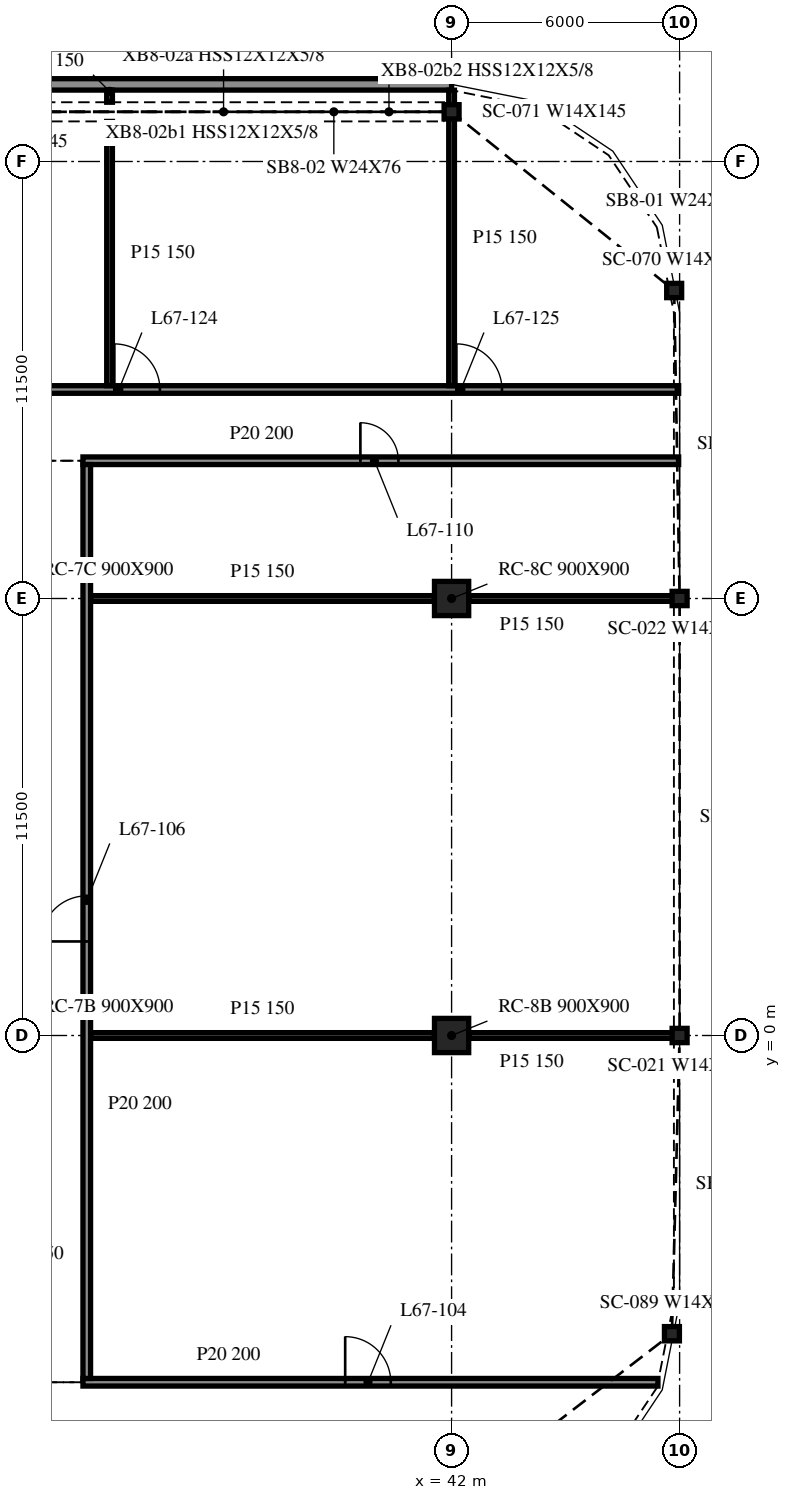
"""IFC4 building model, lengths in metres.
Left out: names, types, materials, properties, quantities, classifications, styles, units other than length and angle.
Written with IfcOpenShell. Run it as: python <this file> out.ifc"""

import sys

from ifc_helpers import new_model, si_unit, direction, frame, frame_2d, origin, origin_2d, place, context, subcontext, project, spatial, rectangle, i_section, extrude, element, fill, save


model = new_model("IFC4")
c1 = context("Model", 3, precision=1e-05, world=origin(), true_north=direction((0.0, 1.0)))
c2 = subcontext(c1, "Body", "Model", "MODEL_VIEW")
j1 = project(units=[si_unit("LENGTHUNIT", "METRE"), si_unit("PLANEANGLEUNIT", "RADIAN")], contexts=[c1])
p1 = place(None, origin())
s1 = spatial("IfcSite", under=j1, at=p1, CompositionType="ELEMENT")
p2 = place(p1, origin())
s2 = spatial("IfcBuilding", under=s1, at=p2, CompositionType="ELEMENT")
p3 = place(p2, frame((0.0, 0.0, 274.7)))
s3 = spatial("IfcBuildingStorey", under=s2, at=p3, CompositionType="ELEMENT", Elevation=274.7)
for number, where, z_axis, x_axis in (
    (1, (42.0, 0.0, -0.34), (0.0, 0.0, 1.0), (1.0, 0.0, 0.0)),
    (2, (42.0, 11.5, -0.34), (0.0, 0.0, 1.0), (1.0, 0.0, 0.0)),
):
    element("IfcColumn", number, at=place(p3, frame(where, z_axis=z_axis, x_axis=x_axis)), inside=s3, PredefinedType="COLUMN", context=c2, shape_type="SweptSolid", body=[
        extrude(rectangle(XDim=0.9, YDim=0.9, at=origin_2d()), origin(), (0.0, 0.0, 1.0), 3.8),
    ])
for number, where, z_axis, x_axis in (
    (3, (47.857, 19.605, -0.34), (0.0, 0.0, 1.0), (1.0, 0.0, 0.0)),
    (4, (42.0, 24.307, -0.34), (0.0, 0.0, 1.0), (1.0, 0.0, 0.0)),
    (5, (47.798, -7.848, -0.34), (0.0, 0.0, 1.0), (1.0, 0.0, 0.0)),
    (6, (48.0, 0.0, -0.34), (0.0, 0.0, 1.0), (1.0, 0.0, 0.0)),
    (7, (48.0, 11.5, -0.34), (0.0, 0.0, 1.0), (1.0, 0.0, 0.0)),
):
    element("IfcColumn", number, at=place(p3, frame(where, z_axis=z_axis, x_axis=x_axis)), inside=s3, PredefinedType="COLUMN", context=c2, shape_type="SweptSolid", body=[
        extrude(i_section(OverallWidth=0.394, OverallDepth=0.376, WebThickness=0.017, FlangeThickness=0.028, at=origin_2d()), origin(), (0.0, 0.0, 1.0), 3.8),
    ])
p4 = place(p3, frame((42.0, 25.029, 0.0), z_axis=(0.0, 0.0, 1.0), x_axis=(-1.0, 0.0, 0.0)))
e8 = element("IfcWall", 8, at=p4, inside=s3, PredefinedType="NOTDEFINED", context=c2, shape_type="SweptSolid", body=[
    extrude(rectangle(XDim=84.0, YDim=0.3, at=frame_2d((42.0, 0.0))), origin(), (0.0, 0.0, 1.0), 2.853),
])
p5 = place(p3, frame((32.3, -9.125, 0.0), z_axis=(0.0, 0.0, 1.0), x_axis=(1.0, 0.0, 0.0)))
e9 = element("IfcWall", 9, at=p5, inside=s3, PredefinedType="PARTITIONING", context=c2, shape_type="SweptSolid", body=[
    extrude(rectangle(XDim=15.13, YDim=0.2, at=frame_2d((7.565, 0.0))), origin(), (0.0, 0.0, 1.0), 3.46),
])
p6 = place(p5, frame((6.9, 0.0, 0.0)))
e10 = element("IfcOpeningElement", 10, at=p6, cuts=e9, PredefinedType="OPENING", context=c2, shape_type="SweptSolid", body=[
    extrude(rectangle(XDim=1.2, YDim=2.1, at=frame_2d((0.6, 1.05))), frame((0.0, 0.11, 0.0), z_axis=(0.0, -1.0, 0.0), x_axis=(1.0, 0.0, 0.0)), (0.0, 0.0, 1.0), 0.22),
])
p7 = place(p3, frame((32.5, 0.0, 0.0), z_axis=(0.0, 0.0, 1.0), x_axis=(1.0, 0.0, 0.0)))
e11 = element("IfcWall", 11, at=p7, inside=s3, PredefinedType="PARTITIONING", context=c2, shape_type="SweptSolid", body=[
    extrude(rectangle(XDim=9.05, YDim=0.15, at=frame_2d((4.525, 0.0))), origin(), (0.0, 0.0, 1.0), 3.46),
])
p8 = place(p3, frame((42.45, 0.0, 0.0), z_axis=(0.0, 0.0, 1.0), x_axis=(1.0, 0.0, 0.0)))
e12 = element("IfcWall", 12, at=p8, inside=s3, PredefinedType="PARTITIONING", context=c2, shape_type="SweptSolid", body=[
    extrude(rectangle(XDim=5.525, YDim=0.15, at=frame_2d((2.763, 0.0))), origin(), (0.0, 0.0, 1.0), 3.46),
])
p9 = place(p3, frame((32.5, 11.5, 0.0), z_axis=(0.0, 0.0, 1.0), x_axis=(1.0, 0.0, 0.0)))
e13 = element("IfcWall", 13, at=p9, inside=s3, PredefinedType="PARTITIONING", context=c2, shape_type="SweptSolid", body=[
    extrude(rectangle(XDim=9.05, YDim=0.15, at=frame_2d((4.525, 0.0))), origin(), (0.0, 0.0, 1.0), 3.46),
])
p10 = place(p3, frame((42.45, 11.5, 0.0), z_axis=(0.0, 0.0, 1.0), x_axis=(1.0, 0.0, 0.0)))
e14 = element("IfcWall", 14, at=p10, inside=s3, PredefinedType="PARTITIONING", context=c2, shape_type="SweptSolid", body=[
    extrude(rectangle(XDim=5.525, YDim=0.15, at=frame_2d((2.763, 0.0))), origin(), (0.0, 0.0, 1.0), 3.46),
])
p11 = place(p3, frame((32.3, 15.125, 0.0), z_axis=(0.0, 0.0, 1.0), x_axis=(1.0, 0.0, 0.0)))
e15 = element("IfcWall", 15, at=p11, inside=s3, PredefinedType="PARTITIONING", context=c2, shape_type="SweptSolid", body=[
    extrude(rectangle(XDim=15.675, YDim=0.2, at=frame_2d((7.837, 0.0))), origin(), (0.0, 0.0, 1.0), 3.46),
])
p12 = place(p11, frame((7.3, 0.0, 0.0)))
e16 = element("IfcOpeningElement", 16, at=p12, cuts=e15, PredefinedType="OPENING", context=c2, shape_type="SweptSolid", body=[
    extrude(rectangle(XDim=1.0, YDim=2.1, at=frame_2d((0.5, 1.05))), frame((0.0, 0.11, 0.0), z_axis=(0.0, -1.0, 0.0), x_axis=(1.0, 0.0, 0.0)), (0.0, 0.0, 1.0), 0.22),
])
p13 = place(p3, frame((-47.975, 17.0, 0.0), z_axis=(0.0, 0.0, 1.0), x_axis=(1.0, 0.0, 0.0)))
e17 = element("IfcWall", 17, at=p13, inside=s3, PredefinedType="PARTITIONING", context=c2, shape_type="SweptSolid", body=[
    extrude(rectangle(XDim=95.95, YDim=0.2, at=frame_2d((47.975, 0.0))), origin(), (0.0, 0.0, 1.0), 3.46),
])
p14 = place(p13, frame((7.3, 0.0, 0.0)))
e18 = element("IfcOpeningElement", 18, at=p14, cuts=e17, PredefinedType="OPENING", context=c2, shape_type="SweptSolid", body=[
    extrude(rectangle(XDim=1.2, YDim=2.1, at=frame_2d((0.6, 1.05))), frame((0.0, 0.11, 0.0), z_axis=(0.0, -1.0, 0.0), x_axis=(1.0, 0.0, 0.0)), (0.0, 0.0, 1.0), 0.22),
])
p15 = place(p13, frame((13.3, 0.0, 0.0)))
e19 = element("IfcOpeningElement", 19, at=p15, cuts=e17, PredefinedType="OPENING", context=c2, shape_type="SweptSolid", body=[
    extrude(rectangle(XDim=1.2, YDim=2.1, at=frame_2d((0.6, 1.05))), frame((0.0, 0.11, 0.0), z_axis=(0.0, -1.0, 0.0), x_axis=(1.0, 0.0, 0.0)), (0.0, 0.0, 1.0), 0.22),
])
p16 = place(p13, frame((19.3, 0.0, 0.0)))
e20 = element("IfcOpeningElement", 20, at=p16, cuts=e17, PredefinedType="OPENING", context=c2, shape_type="SweptSolid", body=[
    extrude(rectangle(XDim=1.2, YDim=2.1, at=frame_2d((0.6, 1.05))), frame((0.0, 0.11, 0.0), z_axis=(0.0, -1.0, 0.0), x_axis=(1.0, 0.0, 0.0)), (0.0, 0.0, 1.0), 0.22),
])
p17 = place(p13, frame((28.5, 0.0, 0.0)))
e21 = element("IfcOpeningElement", 21, at=p17, cuts=e17, PredefinedType="OPENING", context=c2, shape_type="SweptSolid", body=[
    extrude(rectangle(XDim=1.0, YDim=2.1, at=frame_2d((0.5, 1.05))), frame((0.0, 0.11, 0.0), z_axis=(0.0, -1.0, 0.0), x_axis=(1.0, 0.0, 0.0)), (0.0, 0.0, 1.0), 0.22),
])
p18 = place(p13, frame((31.3, 0.0, 0.0)))
e22 = element("IfcOpeningElement", 22, at=p18, cuts=e17, PredefinedType="OPENING", context=c2, shape_type="SweptSolid", body=[
    extrude(rectangle(XDim=1.2, YDim=2.1, at=frame_2d((0.6, 1.05))), frame((0.0, 0.11, 0.0), z_axis=(0.0, -1.0, 0.0), x_axis=(1.0, 0.0, 0.0)), (0.0, 0.0, 1.0), 0.22),
])
p19 = place(p13, frame((37.5, 0.0, 0.0)))
e23 = element("IfcOpeningElement", 23, at=p19, cuts=e17, PredefinedType="OPENING", context=c2, shape_type="SweptSolid", body=[
    extrude(rectangle(XDim=1.0, YDim=2.1, at=frame_2d((0.5, 1.05))), frame((0.0, 0.11, 0.0), z_axis=(0.0, -1.0, 0.0), x_axis=(1.0, 0.0, 0.0)), (0.0, 0.0, 1.0), 0.22),
])
p20 = place(p13, frame((43.3, 0.0, 0.0)))
e24 = element("IfcOpeningElement", 24, at=p20, cuts=e17, PredefinedType="OPENING", context=c2, shape_type="SweptSolid", body=[
    extrude(rectangle(XDim=1.2, YDim=2.1, at=frame_2d((0.6, 1.05))), frame((0.0, 0.11, 0.0), z_axis=(0.0, -1.0, 0.0), x_axis=(1.0, 0.0, 0.0)), (0.0, 0.0, 1.0), 0.22),
])
p21 = place(p13, frame((47.3, 0.0, 0.0)))
e25 = element("IfcOpeningElement", 25, at=p21, cuts=e17, PredefinedType="OPENING", context=c2, shape_type="SweptSolid", body=[
    extrude(rectangle(XDim=1.2, YDim=2.1, at=frame_2d((0.6, 1.05))), frame((0.0, 0.11, 0.0), z_axis=(0.0, -1.0, 0.0), x_axis=(1.0, 0.0, 0.0)), (0.0, 0.0, 1.0), 0.22),
])
p22 = place(p13, frame((51.1, 0.0, 0.0)))
e26 = element("IfcOpeningElement", 26, at=p22, cuts=e17, PredefinedType="OPENING", context=c2, shape_type="SweptSolid", body=[
    extrude(rectangle(XDim=1.2, YDim=2.1, at=frame_2d((0.6, 1.05))), frame((0.0, 0.11, 0.0), z_axis=(0.0, -1.0, 0.0), x_axis=(1.0, 0.0, 0.0)), (0.0, 0.0, 1.0), 0.22),
])
p23 = place(p13, frame((60.1, 0.0, 0.0)))
e27 = element("IfcOpeningElement", 27, at=p23, cuts=e17, PredefinedType="OPENING", context=c2, shape_type="SweptSolid", body=[
    extrude(rectangle(XDim=1.0, YDim=2.1, at=frame_2d((0.5, 1.05))), frame((0.0, 0.11, 0.0), z_axis=(0.0, -1.0, 0.0), x_axis=(1.0, 0.0, 0.0)), (0.0, 0.0, 1.0), 0.22),
])
p24 = place(p13, frame((63.1, 0.0, 0.0)))
e28 = element("IfcOpeningElement", 28, at=p24, cuts=e17, PredefinedType="OPENING", context=c2, shape_type="SweptSolid", body=[
    extrude(rectangle(XDim=1.2, YDim=2.1, at=frame_2d((0.6, 1.05))), frame((0.0, 0.11, 0.0), z_axis=(0.0, -1.0, 0.0), x_axis=(1.0, 0.0, 0.0)), (0.0, 0.0, 1.0), 0.22),
])
p25 = place(p13, frame((69.1, 0.0, 0.0)))
e29 = element("IfcOpeningElement", 29, at=p25, cuts=e17, PredefinedType="OPENING", context=c2, shape_type="SweptSolid", body=[
    extrude(rectangle(XDim=1.0, YDim=2.1, at=frame_2d((0.5, 1.05))), frame((0.0, 0.11, 0.0), z_axis=(0.0, -1.0, 0.0), x_axis=(1.0, 0.0, 0.0)), (0.0, 0.0, 1.0), 0.22),
])
p26 = place(p13, frame((75.1, 0.0, 0.0)))
e30 = element("IfcOpeningElement", 30, at=p26, cuts=e17, PredefinedType="OPENING", context=c2, shape_type="SweptSolid", body=[
    extrude(rectangle(XDim=1.2, YDim=2.1, at=frame_2d((0.6, 1.05))), frame((0.0, 0.11, 0.0), z_axis=(0.0, -1.0, 0.0), x_axis=(1.0, 0.0, 0.0)), (0.0, 0.0, 1.0), 0.22),
])
p27 = place(p13, frame((81.1, 0.0, 0.0)))
e31 = element("IfcOpeningElement", 31, at=p27, cuts=e17, PredefinedType="OPENING", context=c2, shape_type="SweptSolid", body=[
    extrude(rectangle(XDim=1.2, YDim=2.1, at=frame_2d((0.6, 1.05))), frame((0.0, 0.11, 0.0), z_axis=(0.0, -1.0, 0.0), x_axis=(1.0, 0.0, 0.0)), (0.0, 0.0, 1.0), 0.22),
])
p28 = place(p13, frame((90.1, 0.0, 0.0)))
e32 = element("IfcOpeningElement", 32, at=p28, cuts=e17, PredefinedType="OPENING", context=c2, shape_type="SweptSolid", body=[
    extrude(rectangle(XDim=1.2, YDim=2.1, at=frame_2d((0.6, 1.05))), frame((0.0, 0.11, 0.0), z_axis=(0.0, -1.0, 0.0), x_axis=(1.0, 0.0, 0.0)), (0.0, 0.0, 1.0), 0.22),
])
p29 = place(p3, frame((32.4, -9.025, 0.0), z_axis=(0.0, 0.0, 1.0), x_axis=(0.0, 1.0, 0.0)))
e33 = element("IfcWall", 33, at=p29, inside=s3, PredefinedType="PARTITIONING", context=c2, shape_type="SweptSolid", body=[
    extrude(rectangle(XDim=24.05, YDim=0.2, at=frame_2d((12.025, 0.0))), origin(), (0.0, 0.0, 1.0), 3.46),
])
p30 = place(p29, frame((11.5, 0.0, 0.0)))
e34 = element("IfcOpeningElement", 34, at=p30, cuts=e33, PredefinedType="OPENING", context=c2, shape_type="SweptSolid", body=[
    extrude(rectangle(XDim=1.2, YDim=2.1, at=frame_2d((0.6, 1.05))), frame((0.0, 0.11, 0.0), z_axis=(0.0, -1.0, 0.0), x_axis=(1.0, 0.0, 0.0)), (0.0, 0.0, 1.0), 0.22),
])
p31 = place(p3, frame((33.0, 17.1, 0.0), z_axis=(0.0, 0.0, 1.0), x_axis=(0.0, 1.0, 0.0)))
e35 = element("IfcWall", 35, at=p31, inside=s3, PredefinedType="PARTITIONING", context=c2, shape_type="SweptSolid", body=[
    extrude(rectangle(XDim=6.955, YDim=0.15, at=frame_2d((3.477, 0.0))), origin(), (0.0, 0.0, 1.0), 3.46),
])
p32 = place(p3, frame((33.0, 24.559, 0.0), z_axis=(0.0, 0.0, 1.0), x_axis=(0.0, 1.0, 0.0)))
e36 = element("IfcWall", 36, at=p32, inside=s3, PredefinedType="PARTITIONING", context=c2, shape_type="SweptSolid", body=[
    extrude(rectangle(XDim=0.32, YDim=0.15, at=frame_2d((0.16, 0.0))), origin(), (0.0, 0.0, 1.0), 3.46),
])
p33 = place(p3, frame((42.0, 17.1, 0.0), z_axis=(0.0, 0.0, 1.0), x_axis=(0.0, 1.0, 0.0)))
e37 = element("IfcWall", 37, at=p33, inside=s3, PredefinedType="PARTITIONING", context=c2, shape_type="SweptSolid", body=[
    extrude(rectangle(XDim=7.776, YDim=0.15, at=frame_2d((3.888, 0.0))), origin(), (0.0, 0.0, 1.0), 3.46),
])
p34 = place(p6, origin())
e38 = element("IfcDoor", 38, at=p34, inside=s3, OperationType="SINGLE_SWING_LEFT", PredefinedType="DOOR", context=c2, shape_type="SweptSolid", body=[
    extrude(rectangle(XDim=1.2, YDim=2.1, at=frame_2d((0.6, 1.05))), frame((0.0, 0.025, 0.0), z_axis=(0.0, -1.0, 0.0), x_axis=(1.0, 0.0, 0.0)), (0.0, 0.0, 1.0), 0.05),
])
fill(e10, e38)
p35 = place(p30, origin())
e39 = element("IfcDoor", 39, at=p35, inside=s3, OperationType="SINGLE_SWING_LEFT", PredefinedType="DOOR", context=c2, shape_type="SweptSolid", body=[
    extrude(rectangle(XDim=1.2, YDim=2.1, at=frame_2d((0.6, 1.05))), frame((0.0, 0.025, 0.0), z_axis=(0.0, -1.0, 0.0), x_axis=(1.0, 0.0, 0.0)), (0.0, 0.0, 1.0), 0.05),
])
fill(e34, e39)
p36 = place(p12, origin())
e40 = element("IfcDoor", 40, at=p36, inside=s3, OperationType="SINGLE_SWING_LEFT", PredefinedType="DOOR", context=c2, shape_type="SweptSolid", body=[
    extrude(rectangle(XDim=1.0, YDim=2.1, at=frame_2d((0.5, 1.05))), frame((0.0, 0.025, 0.0), z_axis=(0.0, -1.0, 0.0), x_axis=(1.0, 0.0, 0.0)), (0.0, 0.0, 1.0), 0.05),
])
fill(e16, e40)
p37 = place(p27, origin())
e41 = element("IfcDoor", 41, at=p37, inside=s3, OperationType="SINGLE_SWING_RIGHT", PredefinedType="DOOR", context=c2, shape_type="SweptSolid", body=[
    extrude(rectangle(XDim=1.2, YDim=2.1, at=frame_2d((0.6, 1.05))), frame((0.0, 0.025, 0.0), z_axis=(0.0, -1.0, 0.0), x_axis=(1.0, 0.0, 0.0)), (0.0, 0.0, 1.0), 0.05),
])
fill(e31, e41)
p38 = place(p28, origin())
e42 = element("IfcDoor", 42, at=p38, inside=s3, OperationType="SINGLE_SWING_RIGHT", PredefinedType="DOOR", context=c2, shape_type="SweptSolid", body=[
    extrude(rectangle(XDim=1.2, YDim=2.1, at=frame_2d((0.6, 1.05))), frame((0.0, 0.025, 0.0), z_axis=(0.0, -1.0, 0.0), x_axis=(1.0, 0.0, 0.0)), (0.0, 0.0, 1.0), 0.05),
])
fill(e32, e42)
save(model, sys.argv[1])
